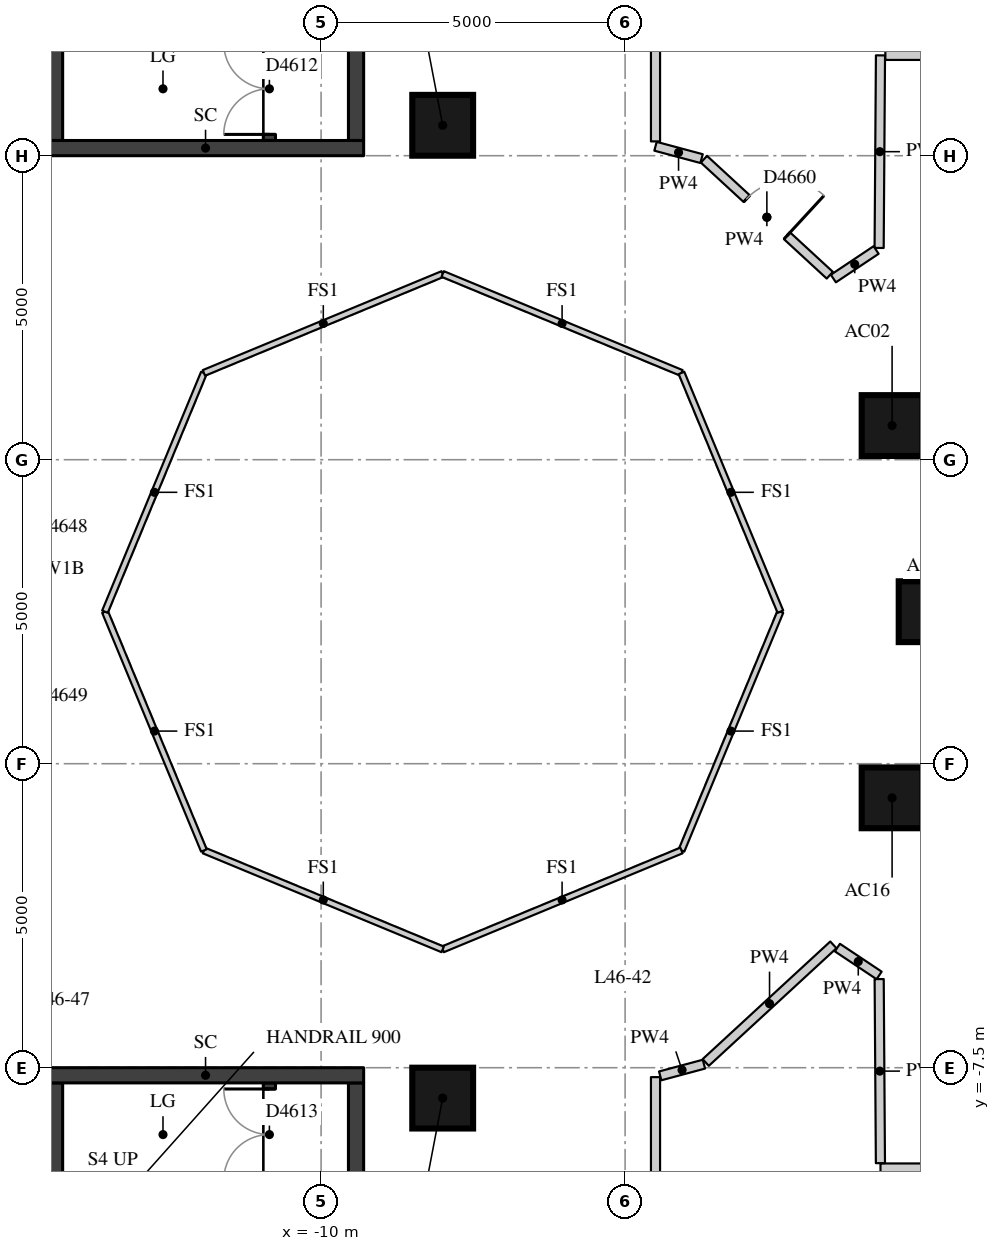
"""IFC4 building model, lengths in metres.
Left out: names, types, materials, properties, quantities, classifications, styles, units other than length and angle.
Written with IfcOpenShell. Run it as: python <this file> out.ifc"""

import sys

from ifc_helpers import new_model, si_unit, direction, frame, frame_2d, origin, origin_2d, place, context, subcontext, project, spatial, rectangle, extrude, element, fill, save


model = new_model("IFC4")
c1 = context("Model", 3, precision=1e-05, world=origin(), true_north=direction((0.0, 1.0)))
c2 = subcontext(c1, "Body", "Model", "MODEL_VIEW")
j1 = project(units=[si_unit("LENGTHUNIT", "METRE"), si_unit("PLANEANGLEUNIT", "RADIAN")], contexts=[c1])
p1 = place(None, origin())
s1 = spatial("IfcSite", under=j1, at=p1, CompositionType="ELEMENT")
p2 = place(p1, origin())
s2 = spatial("IfcBuilding", under=s1, at=p2, CompositionType="ELEMENT")
p3 = place(p2, frame((0.0, 0.0, 164.9)))
s3 = spatial("IfcBuildingStorey", under=s2, at=p3, CompositionType="ELEMENT", Elevation=164.9)
for number, where, z_axis, x_axis in (
    (1, (0.0, 0.0, 0.0), (0.0, 0.0, 1.0), (1.0, 0.0, 0.0)),
    (2, (-0.609, 3.062, 0.0), (0.0, 0.0, 1.0), (1.0, 0.0, 0.0)),
    (3, (-8.0, 8.0, 0.0), (0.0, 0.0, 1.0), (1.0, 0.0, 0.0)),
    (4, (-8.0, -8.0, 0.0), (0.0, 0.0, 1.0), (1.0, 0.0, 0.0)),
    (5, (-0.609, -3.062, 0.0), (0.0, 0.0, 1.0), (1.0, 0.0, 0.0)),
):
    element("IfcColumn", number, at=place(p3, frame(where, z_axis=z_axis, x_axis=x_axis)), inside=s3, PredefinedType="COLUMN", context=c2, shape_type="SweptSolid", body=[
        extrude(rectangle(XDim=1.0, YDim=1.0, at=origin_2d()), origin(), (0.0, 0.0, 1.0), 3.3),
    ])
p4 = place(p3, frame((-10.85, 7.75, 0.0), z_axis=(0.0, 0.0, 1.0), x_axis=(0.0, 1.0, 0.0)))
e6 = element("IfcWall", 6, at=p4, inside=s3, PredefinedType="SHEAR", context=c2, shape_type="SweptSolid", body=[
    extrude(rectangle(XDim=6.0, YDim=0.2, at=frame_2d((3.0, 0.0))), origin(), (0.0, 0.0, 1.0), 3.02),
])
p5 = place(p4, frame((0.1, 0.0, 0.0)))
e7 = element("IfcOpeningElement", 7, at=p5, cuts=e6, PredefinedType="OPENING", context=c2, shape_type="SweptSolid", body=[
    extrude(rectangle(XDim=1.5, YDim=2.1, at=frame_2d((0.75, 1.05))), frame((0.0, 0.11, 0.0), z_axis=(0.0, -1.0, 0.0), x_axis=(1.0, 0.0, 0.0)), (0.0, 0.0, 1.0), 0.22),
])
p6 = place(p3, frame((-10.85, -13.75, 0.0), z_axis=(0.0, 0.0, 1.0), x_axis=(0.0, 1.0, 0.0)))
e8 = element("IfcWall", 8, at=p6, inside=s3, PredefinedType="SHEAR", context=c2, shape_type="SweptSolid", body=[
    extrude(rectangle(XDim=6.0, YDim=0.2, at=frame_2d((3.0, 0.0))), origin(), (0.0, 0.0, 1.0), 3.02),
])
p7 = place(p6, frame((4.4, 0.0, 0.0)))
e9 = element("IfcOpeningElement", 9, at=p7, cuts=e8, PredefinedType="OPENING", context=c2, shape_type="SweptSolid", body=[
    extrude(rectangle(XDim=1.5, YDim=2.1, at=frame_2d((0.75, 1.05))), frame((0.0, 0.11, 0.0), z_axis=(0.0, -1.0, 0.0), x_axis=(1.0, 0.0, 0.0)), (0.0, 0.0, 1.0), 0.22),
])
p8 = place(p3, frame((-14.375, 7.75, -0.28), z_axis=(0.0, 0.0, 1.0), x_axis=(0.0, 1.0, 0.0)))
e10 = element("IfcWall", 10, at=p8, inside=s3, PredefinedType="SHEAR", context=c2, shape_type="SweptSolid", body=[
    extrude(rectangle(XDim=6.0, YDim=0.25, at=frame_2d((3.0, 0.0))), origin(), (0.0, 0.0, 1.0), 3.3),
])
p9 = place(p3, frame((-9.425, 7.75, -0.28), z_axis=(0.0, 0.0, 1.0), x_axis=(0.0, 1.0, 0.0)))
e11 = element("IfcWall", 11, at=p9, inside=s3, PredefinedType="SHEAR", context=c2, shape_type="SweptSolid", body=[
    extrude(rectangle(XDim=6.0, YDim=0.25, at=frame_2d((3.0, 0.0))), origin(), (0.0, 0.0, 1.0), 3.3),
])
p10 = place(p9, frame((2.1, 0.0, 0.28)))
e12 = element("IfcOpeningElement", 12, at=p10, cuts=e11, PredefinedType="OPENING", context=c2, shape_type="SweptSolid", body=[
    extrude(rectangle(XDim=1.5, YDim=2.1, at=frame_2d((0.75, 1.05))), frame((0.0, 0.135, 0.0), z_axis=(0.0, -1.0, 0.0), x_axis=(1.0, 0.0, 0.0)), (0.0, 0.0, 1.0), 0.27),
])
p11 = place(p3, frame((-14.5, 7.625, -0.28), z_axis=(0.0, 0.0, 1.0), x_axis=(1.0, 0.0, 0.0)))
e13 = element("IfcWall", 13, at=p11, inside=s3, PredefinedType="SHEAR", context=c2, shape_type="SweptSolid", body=[
    extrude(rectangle(XDim=5.2, YDim=0.25, at=frame_2d((2.6, 0.0))), origin(), (0.0, 0.0, 1.0), 3.3),
])
p12 = place(p3, frame((-14.375, -13.75, -0.28), z_axis=(0.0, 0.0, 1.0), x_axis=(0.0, 1.0, 0.0)))
e14 = element("IfcWall", 14, at=p12, inside=s3, PredefinedType="SHEAR", context=c2, shape_type="SweptSolid", body=[
    extrude(rectangle(XDim=6.0, YDim=0.25, at=frame_2d((3.0, 0.0))), origin(), (0.0, 0.0, 1.0), 3.3),
])
p13 = place(p3, frame((-9.425, -13.75, -0.28), z_axis=(0.0, 0.0, 1.0), x_axis=(0.0, 1.0, 0.0)))
e15 = element("IfcWall", 15, at=p13, inside=s3, PredefinedType="SHEAR", context=c2, shape_type="SweptSolid", body=[
    extrude(rectangle(XDim=6.0, YDim=0.25, at=frame_2d((3.0, 0.0))), origin(), (0.0, 0.0, 1.0), 3.3),
])
p14 = place(p13, frame((2.4, 0.0, 0.28)))
e16 = element("IfcOpeningElement", 16, at=p14, cuts=e15, PredefinedType="OPENING", context=c2, shape_type="SweptSolid", body=[
    extrude(rectangle(XDim=1.5, YDim=2.1, at=frame_2d((0.75, 1.05))), frame((0.0, 0.135, 0.0), z_axis=(0.0, -1.0, 0.0), x_axis=(1.0, 0.0, 0.0)), (0.0, 0.0, 1.0), 0.27),
])
p15 = place(p3, frame((-14.5, -7.625, -0.28), z_axis=(0.0, 0.0, 1.0), x_axis=(1.0, 0.0, 0.0)))
e17 = element("IfcWall", 17, at=p15, inside=s3, PredefinedType="SHEAR", context=c2, shape_type="SweptSolid", body=[
    extrude(rectangle(XDim=5.2, YDim=0.25, at=frame_2d((2.6, 0.0))), origin(), (0.0, 0.0, 1.0), 3.3),
])
p16 = place(p3, frame((-0.8, 9.15, 0.0), z_axis=(0.0, 0.0, 1.0), x_axis=(-0.007013855529, -0.999975402613, 0.0)))
e18 = element("IfcWall", 18, at=p16, inside=s3, PredefinedType="PARTITIONING", context=c2, shape_type="SweptSolid", body=[
    extrude(rectangle(XDim=3.167, YDim=0.15, at=frame_2d((1.584, 0.0))), origin(), (0.0, 0.0, 1.0), 3.02),
])
p17 = place(p3, frame((-0.872, 5.949, 0.0), z_axis=(0.0, 0.0, 1.0), x_axis=(-0.831694574928, -0.555233405006, 0.0)))
e19 = element("IfcWall", 19, at=p17, inside=s3, PredefinedType="PARTITIONING", context=c2, shape_type="SweptSolid", body=[
    extrude(rectangle(XDim=0.845, YDim=0.15, at=frame_2d((0.423, 0.0))), origin(), (0.0, 0.0, 1.0), 3.02),
])
p18 = place(p3, frame((-1.634, 5.534, 0.0), z_axis=(0.0, 0.0, 1.0), x_axis=(-0.735398368623, 0.67763503409, 0.0)))
e20 = element("IfcWall", 20, at=p18, inside=s3, PredefinedType="PARTITIONING", context=c2, shape_type="SweptSolid", body=[
    extrude(rectangle(XDim=2.815, YDim=0.15, at=frame_2d((1.407, 0.0))), origin(), (0.0, 0.0, 1.0), 3.02),
])
p19 = place(p18, frame((0.958, 0.0, 0.0)))
e21 = element("IfcOpeningElement", 21, at=p19, cuts=e20, PredefinedType="OPENING", context=c2, shape_type="SweptSolid", body=[
    extrude(rectangle(XDim=0.9, YDim=2.1, at=frame_2d((0.45, 1.05))), frame((0.0, 0.085, 0.0), z_axis=(0.0, -1.0, 0.0), x_axis=(1.0, 0.0, 0.0)), (0.0, 0.0, 1.0), 0.17),
])
p20 = place(p3, frame((-3.742, 7.452, 0.0), z_axis=(0.0, 0.0, 1.0), x_axis=(-0.965903596155, 0.258901994846, 0.0)))
e22 = element("IfcWall", 22, at=p20, inside=s3, PredefinedType="PARTITIONING", context=c2, shape_type="SweptSolid", body=[
    extrude(rectangle(XDim=0.785, YDim=0.15, at=frame_2d((0.392, 0.0))), origin(), (0.0, 0.0, 1.0), 3.02),
])
p21 = place(p3, frame((-4.5, 7.735, 0.0), z_axis=(0.0, 0.0, 1.0), x_axis=(0.0, 1.0, 0.0)))
e23 = element("IfcWall", 23, at=p21, inside=s3, PredefinedType="PARTITIONING", context=c2, shape_type="SweptSolid", body=[
    extrude(rectangle(XDim=3.848, YDim=0.15, at=frame_2d((1.924, 0.0))), origin(), (0.0, 0.0, 1.0), 3.02),
])
p22 = place(p3, frame((1.32, 9.15, 0.0), z_axis=(0.0, 0.0, 1.0), x_axis=(-1.0, 0.0, 0.0)))
e24 = element("IfcWall", 24, at=p22, inside=s3, PredefinedType="PARTITIONING", context=c2, shape_type="SweptSolid", body=[
    extrude(rectangle(XDim=2.04, YDim=0.15, at=frame_2d((1.02, 0.0))), origin(), (0.0, 0.0, 1.0), 3.02),
])
p23 = place(p3, frame((-0.8, -9.15, 0.0), z_axis=(0.0, 0.0, 1.0), x_axis=(1.0, 0.0, 0.0)))
e25 = element("IfcWall", 25, at=p23, inside=s3, PredefinedType="PARTITIONING", context=c2, shape_type="SweptSolid", body=[
    extrude(rectangle(XDim=2.2, YDim=0.15, at=frame_2d((1.1, 0.0))), origin(), (0.0, 0.0, 1.0), 3.02),
])
p24 = place(p3, frame((-4.5, -11.143, 0.0), z_axis=(0.0, 0.0, 1.0), x_axis=(0.0, 1.0, 0.0)))
e26 = element("IfcWall", 26, at=p24, inside=s3, PredefinedType="PARTITIONING", context=c2, shape_type="SweptSolid", body=[
    extrude(rectangle(XDim=3.488, YDim=0.15, at=frame_2d((1.744, 0.0))), origin(), (0.0, 0.0, 1.0), 3.02),
])
p25 = place(p3, frame((-4.423, -7.635, 0.0), z_axis=(0.0, 0.0, 1.0), x_axis=(0.965874851679, 0.259009210056, 0.0)))
e27 = element("IfcWall", 27, at=p25, inside=s3, PredefinedType="PARTITIONING", context=c2, shape_type="SweptSolid", body=[
    extrude(rectangle(XDim=0.745, YDim=0.15, at=frame_2d((0.372, 0.0))), origin(), (0.0, 0.0, 1.0), 3.02),
])
p26 = place(p3, frame((-3.674, -7.414, 0.0), z_axis=(0.0, 0.0, 1.0), x_axis=(0.735337612747, 0.677700963021, 0.0)))
e28 = element("IfcWall", 28, at=p26, inside=s3, PredefinedType="PARTITIONING", context=c2, shape_type="SweptSolid", body=[
    extrude(rectangle(XDim=2.855, YDim=0.15, at=frame_2d((1.427, 0.0))), origin(), (0.0, 0.0, 1.0), 3.02),
])
p27 = place(p3, frame((-1.509, -5.524, 0.0), z_axis=(0.0, 0.0, 1.0), x_axis=(0.831777054297, -0.555109837731, 0.0)))
e29 = element("IfcWall", 29, at=p27, inside=s3, PredefinedType="PARTITIONING", context=c2, shape_type="SweptSolid", body=[
    extrude(rectangle(XDim=0.825, YDim=0.15, at=frame_2d((0.413, 0.0))), origin(), (0.0, 0.0, 1.0), 3.02),
])
p28 = place(p3, frame((-0.822, -6.042, 0.0), z_axis=(0.0, 0.0, 1.0), x_axis=(0.006774038121, -0.999977055941, 0.0)))
e30 = element("IfcWall", 30, at=p28, inside=s3, PredefinedType="PARTITIONING", context=c2, shape_type="SweptSolid", body=[
    extrude(rectangle(XDim=3.027, YDim=0.15, at=frame_2d((1.514, 0.0))), origin(), (0.0, 0.0, 1.0), 3.02),
])
for number, where, z_axis, x_axis in (
    (31, (-2.446, 0.0, 0.0), (0.0, 0.0, 1.0), (-0.383, -0.924, 0.0)),
    (32, (-4.073, -3.927, 0.0), (0.0, 0.0, 1.0), (-0.924, -0.383, 0.0)),
    (33, (-8.0, -5.554, 0.0), (0.0, 0.0, 1.0), (-0.924, 0.383, 0.0)),
    (34, (-11.927, -3.927, 0.0), (0.0, 0.0, 1.0), (-0.383, 0.924, 0.0)),
    (35, (-13.554, 0.0, 0.0), (0.0, 0.0, 1.0), (0.383, 0.924, 0.0)),
    (36, (-11.927, 3.927, 0.0), (0.0, 0.0, 1.0), (0.924, 0.383, 0.0)),
    (37, (-8.0, 5.554, 0.0), (0.0, 0.0, 1.0), (0.924, -0.383, 0.0)),
    (38, (-4.073, 3.927, 0.0), (0.0, 0.0, 1.0), (0.383, -0.924, 0.0)),
):
    element("IfcWall", number, at=place(p3, frame(where, z_axis=z_axis, x_axis=x_axis)), inside=s3, PredefinedType="PARTITIONING", context=c2, shape_type="SweptSolid", body=[
        extrude(rectangle(XDim=4.251, YDim=0.1, at=frame_2d((2.125, 0.0))), origin(), (0.0, 0.0, 1.0), 3.02),
    ])
p29 = place(p5, origin())
e39 = element("IfcDoor", 39, at=p29, inside=s3, OperationType="DOUBLE_DOOR_SINGLE_SWING", PredefinedType="DOOR", context=c2, shape_type="SweptSolid", body=[
    extrude(rectangle(XDim=1.5, YDim=2.1, at=frame_2d((0.75, 1.05))), frame((0.0, 0.025, 0.0), z_axis=(0.0, -1.0, 0.0), x_axis=(1.0, 0.0, 0.0)), (0.0, 0.0, 1.0), 0.05),
])
fill(e7, e39)
p30 = place(p7, origin())
e40 = element("IfcDoor", 40, at=p30, inside=s3, OperationType="DOUBLE_DOOR_SINGLE_SWING", PredefinedType="DOOR", context=c2, shape_type="SweptSolid", body=[
    extrude(rectangle(XDim=1.5, YDim=2.1, at=frame_2d((0.75, 1.05))), frame((0.0, 0.025, 0.0), z_axis=(0.0, -1.0, 0.0), x_axis=(1.0, 0.0, 0.0)), (0.0, 0.0, 1.0), 0.05),
])
fill(e9, e40)
p31 = place(p19, origin())
e41 = element("IfcDoor", 41, at=p31, inside=s3, OperationType="SINGLE_SWING_RIGHT", PredefinedType="DOOR", context=c2, shape_type="SweptSolid", body=[
    extrude(rectangle(XDim=0.9, YDim=2.1, at=frame_2d((0.45, 1.05))), frame((0.0, 0.025, 0.0), z_axis=(0.0, -1.0, 0.0), x_axis=(1.0, 0.0, 0.0)), (0.0, 0.0, 1.0), 0.05),
])
fill(e21, e41)
save(model, sys.argv[1])
